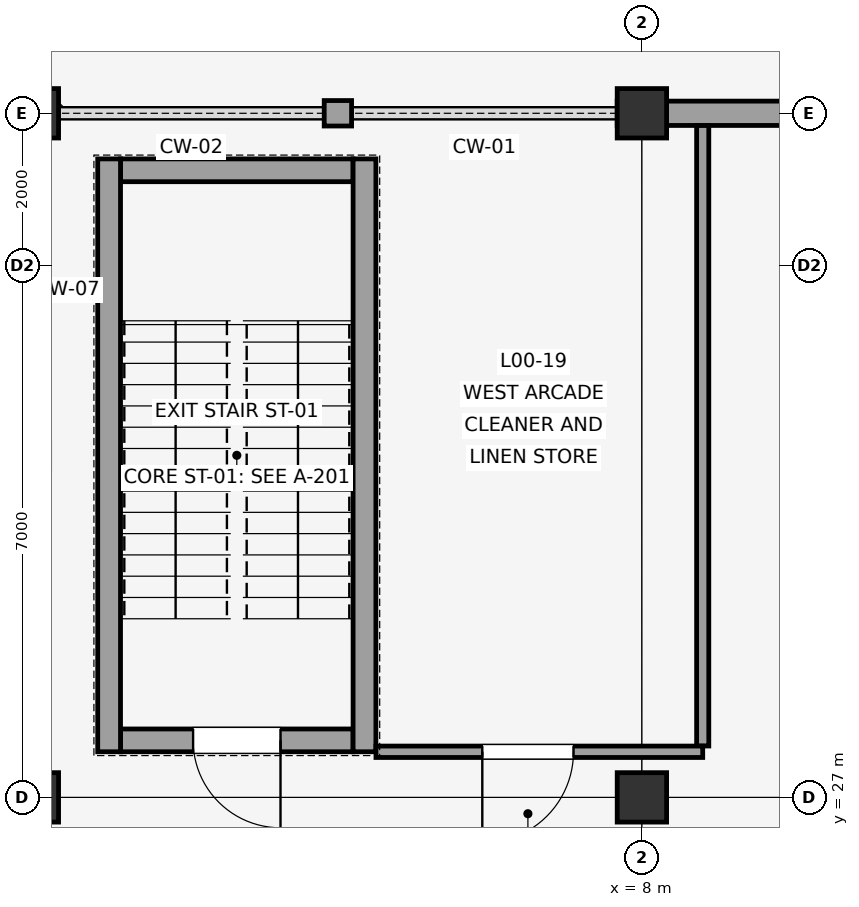
"""IFC4 building model, lengths in metres.
Left out: names, types, materials, properties, quantities, classifications, styles, units other than length and angle.
Written with IfcOpenShell. Run it as: python <this file> out.ifc"""

import sys

from ifc_helpers import new_model, si_unit, direction, frame, frame_2d, origin, origin_2d, place, context, subcontext, project, spatial, rectangle, extrude, element, fill, save


model = new_model("IFC4")
c1 = context("Model", 3, precision=1e-05, world=origin(), true_north=direction((0.0, 1.0)))
c2 = subcontext(c1, "Body", "Model", "MODEL_VIEW")
j1 = project(units=[si_unit("LENGTHUNIT", "METRE"), si_unit("PLANEANGLEUNIT", "RADIAN")], contexts=[c1])
p1 = place(None, origin())
s1 = spatial("IfcSite", under=j1, at=p1, CompositionType="ELEMENT")
p2 = place(p1, origin())
s2 = spatial("IfcBuilding", under=s1, at=p2, CompositionType="ELEMENT")
p3 = place(p2, origin())
s3 = spatial("IfcBuildingStorey", under=s2, at=p3, CompositionType="ELEMENT", Elevation=0.0)
for number, where, z_axis, x_axis in (
    (1, (0.0, 27.0, 0.0), (0.0, 0.0, 1.0), (1.0, 0.0, 0.0)),
    (2, (0.0, 36.0, 0.0), (0.0, 0.0, 1.0), (1.0, 0.0, 0.0)),
    (3, (8.0, 27.0, 0.0), (0.0, 0.0, 1.0), (1.0, 0.0, 0.0)),
    (4, (8.0, 36.0, 0.0), (0.0, 0.0, 1.0), (1.0, 0.0, 0.0)),
):
    element("IfcColumn", number, at=place(p3, frame(where, z_axis=z_axis, x_axis=x_axis)), inside=s3, PredefinedType="COLUMN", context=c2, shape_type="SweptSolid", body=[
        extrude(rectangle(XDim=0.65, YDim=0.65, at=origin_2d()), origin(), (0.0, 0.0, 1.0), 4.5),
    ])
p4 = place(p3, frame((4.18, 36.0, 0.0), z_axis=(0.0, 0.0, 1.0), x_axis=(-1.0, 0.0, 0.0)))
e5 = element("IfcWall", 5, at=p4, inside=s3, PredefinedType="SOLIDWALL", context=c2, shape_type="SweptSolid", body=[
    extrude(rectangle(XDim=0.36, YDim=0.335, at=frame_2d((0.18, 0.0))), origin(), (0.0, 0.0, 1.0), 3.12),
])
p5 = place(p3, frame((16.325, 36.0, 0.0), z_axis=(0.0, 0.0, 1.0), x_axis=(-1.0, 0.0, 0.0)))
e6 = element("IfcWall", 6, at=p5, inside=s3, PredefinedType="SOLIDWALL", context=c2, shape_type="SweptSolid", body=[
    extrude(rectangle(XDim=8.65, YDim=0.32, at=frame_2d((4.325, 0.0))), origin(), (0.0, 0.0, 1.0), 3.12),
])
p6 = place(p3, frame((4.2, 27.75, 0.0), z_axis=(0.0, 0.0, 1.0), x_axis=(-1.0, 0.0, 0.0)))
e7 = element("IfcWall", 7, at=p6, inside=s3, PredefinedType="SHEAR", context=c2, shape_type="SweptSolid", body=[
    extrude(rectangle(XDim=3.06, YDim=0.3, at=frame_2d((1.53, 0.0))), origin(), (0.0, 0.0, 1.0), 4.5),
])
p7 = place(p6, frame((0.955, 0.0, 0.0)))
e8 = element("IfcOpeningElement", 8, at=p7, cuts=e7, PredefinedType="OPENING", context=c2, shape_type="SweptSolid", body=[
    extrude(rectangle(XDim=1.15, YDim=2.15, at=frame_2d((0.575, 1.075))), frame((0.0, 0.16, 0.0), z_axis=(0.0, -1.0, 0.0), x_axis=(1.0, 0.0, 0.0)), (0.0, 0.0, 1.0), 0.32),
])
p8 = place(p3, frame((4.2, 35.25, 0.0), z_axis=(0.0, 0.0, 1.0), x_axis=(-1.0, 0.0, 0.0)))
e9 = element("IfcWall", 9, at=p8, inside=s3, PredefinedType="SHEAR", context=c2, shape_type="SweptSolid", body=[
    extrude(rectangle(XDim=3.06, YDim=0.3, at=frame_2d((1.53, 0.0))), origin(), (0.0, 0.0, 1.0), 4.5),
])
for number, where, z_axis, x_axis in (
    (10, (4.35, 27.6, 0.0), (0.0, 0.0, 1.0), (0.0, 1.0, 0.0)),
    (11, (0.99, 27.6, 0.0), (0.0, 0.0, 1.0), (0.0, 1.0, 0.0)),
):
    element("IfcWall", number, at=place(p3, frame(where, z_axis=z_axis, x_axis=x_axis)), inside=s3, PredefinedType="SHEAR", context=c2, shape_type="SweptSolid", body=[
        extrude(rectangle(XDim=7.8, YDim=0.3, at=frame_2d((3.9, 0.0))), origin(), (0.0, 0.0, 1.0), 4.5),
    ])
p9 = place(p3, frame((8.8, 35.839, 0.0), z_axis=(0.0, 0.0, 1.0), x_axis=(0.0, -1.0, 0.0)))
e12 = element("IfcWall", 12, at=p9, inside=s3, PredefinedType="PARTITIONING", context=c2, shape_type="SweptSolid", body=[
    extrude(rectangle(XDim=8.163, YDim=0.16, at=frame_2d((4.082, 0.0))), origin(), (0.0, 0.0, 1.0), 2.7),
])
p10 = place(p3, frame((8.8, 27.6, 0.0), z_axis=(0.0, 0.0, 1.0), x_axis=(-1.0, 0.0, 0.0)))
e13 = element("IfcWall", 13, at=p10, inside=s3, PredefinedType="PARTITIONING", context=c2, shape_type="SweptSolid", body=[
    extrude(rectangle(XDim=4.299, YDim=0.15, at=frame_2d((2.149, 0.0))), origin(), (0.0, 0.0, 1.0), 2.7),
])
p11 = place(p10, frame((1.7, 0.0, 0.0)))
e14 = element("IfcOpeningElement", 14, at=p11, cuts=e13, PredefinedType="OPENING", context=c2, shape_type="SweptSolid", body=[
    extrude(rectangle(XDim=1.2, YDim=2.18, at=frame_2d((0.6, 1.09))), frame((0.0, 0.085, 0.0), z_axis=(0.0, -1.0, 0.0), x_axis=(1.0, 0.0, 0.0)), (0.0, 0.0, 1.0), 0.17),
])
p12 = place(p7, origin())
e15 = element("IfcDoor", 15, at=p12, inside=s3, OperationType="SINGLE_SWING_LEFT", PredefinedType="DOOR", context=c2, shape_type="SweptSolid", body=[
    extrude(rectangle(XDim=1.15, YDim=2.15, at=frame_2d((0.575, 1.075))), frame((0.0, 0.025, 0.0), z_axis=(0.0, -1.0, 0.0), x_axis=(1.0, 0.0, 0.0)), (0.0, 0.0, 1.0), 0.05),
])
fill(e8, e15)
p13 = place(p11, origin())
e16 = element("IfcDoor", 16, at=p13, inside=s3, OperationType="SINGLE_SWING_RIGHT", PredefinedType="DOOR", context=c2, shape_type="SweptSolid", body=[
    extrude(rectangle(XDim=1.2, YDim=2.18, at=frame_2d((0.6, 1.09))), frame((0.0, 0.025, 0.0), z_axis=(0.0, -1.0, 0.0), x_axis=(1.0, 0.0, 0.0)), (0.0, 0.0, 1.0), 0.05),
])
fill(e14, e16)
save(model, sys.argv[1])
